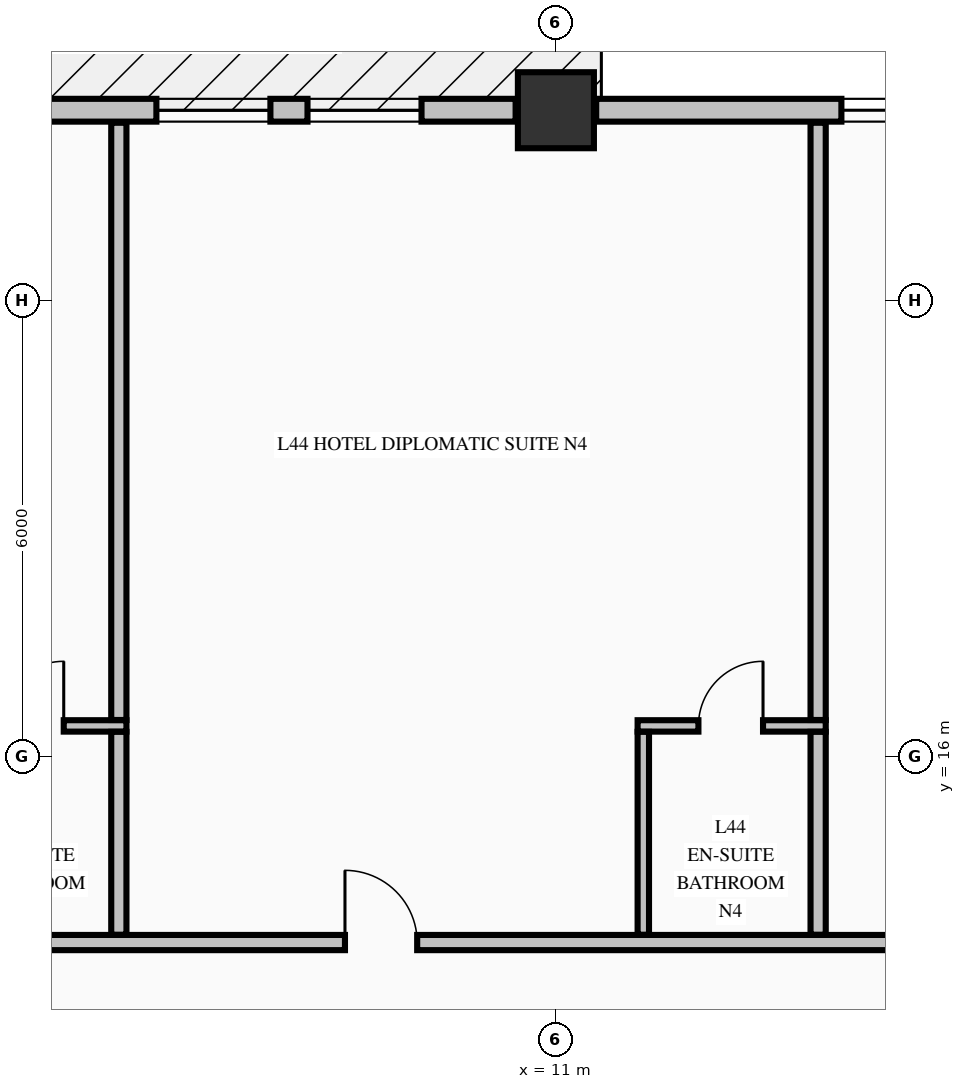
"""IFC4 building model, lengths in metres.
Left out: names, types, materials, properties, quantities, classifications, styles, units other than length and angle.
Written with IfcOpenShell. Run it as: python <this file> out.ifc"""

import sys

from ifc_helpers import new_model, si_unit, direction, frame, frame_2d, origin, origin_2d, place, context, subcontext, project, spatial, rectangle, extrude, element, fill, save


model = new_model("IFC4")
c1 = context("Model", 3, precision=1e-05, world=origin(), true_north=direction((0.0, 1.0)))
c2 = subcontext(c1, "Body", "Model", "MODEL_VIEW")
j1 = project(units=[si_unit("LENGTHUNIT", "METRE"), si_unit("PLANEANGLEUNIT", "RADIAN")], contexts=[c1])
p1 = place(None, origin())
s1 = spatial("IfcSite", under=j1, at=p1, CompositionType="ELEMENT")
p2 = place(p1, origin())
s2 = spatial("IfcBuilding", under=s1, at=p2, CompositionType="ELEMENT")
p3 = place(p2, frame((0.0, 0.0, 172.86)))
s3 = spatial("IfcBuildingStorey", under=s2, at=p3, CompositionType="ELEMENT", Elevation=172.86)
p4 = place(p3, frame((11.0, 24.5, -0.25), z_axis=(0.0, 0.0, 1.0), x_axis=(1.0, 0.0, 0.0)))
e1 = element("IfcColumn", 1, at=p4, inside=s3, PredefinedType="COLUMN", context=c2, shape_type="SweptSolid", body=[
    extrude(rectangle(XDim=1.0, YDim=1.0, at=origin_2d()), origin(), (0.0, 0.0, 1.0), 3.375),
])
p5 = place(p3, frame((10.47, 24.5, 0.0), z_axis=(0.0, 0.0, 1.0), x_axis=(-1.0, 0.0, 0.0)))
e2 = element("IfcWall", 2, at=p5, inside=s3, PredefinedType="STANDARD", context=c2, shape_type="SweptSolid", body=[
    extrude(rectangle(XDim=9.94, YDim=0.3, at=frame_2d((4.97, 0.0))), origin(), (0.0, 0.0, 1.0), 2.517),
])
p6 = place(p5, frame((1.238, 0.0, 0.72)))
e3 = element("IfcOpeningElement", 3, at=p6, cuts=e2, PredefinedType="OPENING", context=c2, shape_type="SweptSolid", body=[
    extrude(rectangle(XDim=1.5, YDim=1.6, at=frame_2d((0.75, 0.8))), frame((0.0, 0.16, 0.0), z_axis=(0.0, -1.0, 0.0), x_axis=(1.0, 0.0, 0.0)), (0.0, 0.0, 1.0), 0.32),
])
p7 = place(p5, frame((3.226, 0.0, 0.72)))
e4 = element("IfcOpeningElement", 4, at=p7, cuts=e2, PredefinedType="OPENING", context=c2, shape_type="SweptSolid", body=[
    extrude(rectangle(XDim=1.5, YDim=1.6, at=frame_2d((0.75, 0.8))), frame((0.0, 0.16, 0.0), z_axis=(0.0, -1.0, 0.0), x_axis=(1.0, 0.0, 0.0)), (0.0, 0.0, 1.0), 0.32),
])
p8 = place(p5, frame((7.202, 0.0, 0.72)))
e5 = element("IfcOpeningElement", 5, at=p8, cuts=e2, PredefinedType="OPENING", context=c2, shape_type="SweptSolid", body=[
    extrude(rectangle(XDim=1.5, YDim=1.6, at=frame_2d((0.75, 0.8))), frame((0.0, 0.16, 0.0), z_axis=(0.0, -1.0, 0.0), x_axis=(1.0, 0.0, 0.0)), (0.0, 0.0, 1.0), 0.32),
])
p9 = place(p3, frame((21.47, 24.5, 0.0), z_axis=(0.0, 0.0, 1.0), x_axis=(-1.0, 0.0, 0.0)))
e6 = element("IfcWall", 6, at=p9, inside=s3, PredefinedType="STANDARD", context=c2, shape_type="SweptSolid", body=[
    extrude(rectangle(XDim=9.94, YDim=0.3, at=frame_2d((4.97, 0.0))), origin(), (0.0, 0.0, 1.0), 2.517),
])
p10 = place(p9, frame((3.226, 0.0, 0.72)))
e7 = element("IfcOpeningElement", 7, at=p10, cuts=e6, PredefinedType="OPENING", context=c2, shape_type="SweptSolid", body=[
    extrude(rectangle(XDim=1.5, YDim=1.6, at=frame_2d((0.75, 0.8))), frame((0.0, 0.16, 0.0), z_axis=(0.0, -1.0, 0.0), x_axis=(1.0, 0.0, 0.0)), (0.0, 0.0, 1.0), 0.32),
])
p11 = place(p9, frame((5.214, 0.0, 0.72)))
e8 = element("IfcOpeningElement", 8, at=p11, cuts=e6, PredefinedType="OPENING", context=c2, shape_type="SweptSolid", body=[
    extrude(rectangle(XDim=1.5, YDim=1.6, at=frame_2d((0.75, 0.8))), frame((0.0, 0.16, 0.0), z_axis=(0.0, -1.0, 0.0), x_axis=(1.0, 0.0, 0.0)), (0.0, 0.0, 1.0), 0.32),
])
p12 = place(p3, frame((-17.1, 13.55, 0.0), z_axis=(0.0, 0.0, 1.0), x_axis=(1.0, 0.0, 0.0)))
e9 = element("IfcWall", 9, at=p12, inside=s3, PredefinedType="PARTITIONING", context=c2, shape_type="SweptSolid", body=[
    extrude(rectangle(XDim=39.2, YDim=0.2, at=frame_2d((19.6, 0.0))), origin(), (0.0, 0.0, 1.0), 3.125),
])
p13 = place(p12, frame((3.695, 0.0, 0.0)))
e10 = element("IfcOpeningElement", 10, at=p13, cuts=e9, PredefinedType="OPENING", context=c2, shape_type="SweptSolid", body=[
    extrude(rectangle(XDim=0.95, YDim=2.15, at=frame_2d((0.475, 1.075))), frame((0.0, 0.11, 0.0), z_axis=(0.0, -1.0, 0.0), x_axis=(1.0, 0.0, 0.0)), (0.0, 0.0, 1.0), 0.22),
])
p14 = place(p12, frame((11.695, 0.0, 0.0)))
e11 = element("IfcOpeningElement", 11, at=p14, cuts=e9, PredefinedType="OPENING", context=c2, shape_type="SweptSolid", body=[
    extrude(rectangle(XDim=0.95, YDim=2.15, at=frame_2d((0.475, 1.075))), frame((0.0, 0.11, 0.0), z_axis=(0.0, -1.0, 0.0), x_axis=(1.0, 0.0, 0.0)), (0.0, 0.0, 1.0), 0.22),
])
p15 = place(p12, frame((17.125, 0.0, 0.0)))
e12 = element("IfcOpeningElement", 12, at=p15, cuts=e9, PredefinedType="OPENING", context=c2, shape_type="SweptSolid", body=[
    extrude(rectangle(XDim=0.95, YDim=2.15, at=frame_2d((0.475, 1.075))), frame((0.0, 0.11, 0.0), z_axis=(0.0, -1.0, 0.0), x_axis=(1.0, 0.0, 0.0)), (0.0, 0.0, 1.0), 0.22),
])
p16 = place(p12, frame((25.325, 0.0, 0.0)))
e13 = element("IfcOpeningElement", 13, at=p16, cuts=e9, PredefinedType="OPENING", context=c2, shape_type="SweptSolid", body=[
    extrude(rectangle(XDim=0.95, YDim=2.15, at=frame_2d((0.475, 1.075))), frame((0.0, 0.11, 0.0), z_axis=(0.0, -1.0, 0.0), x_axis=(1.0, 0.0, 0.0)), (0.0, 0.0, 1.0), 0.22),
])
p17 = place(p12, frame((33.695, 0.0, 0.0)))
e14 = element("IfcOpeningElement", 14, at=p17, cuts=e9, PredefinedType="OPENING", context=c2, shape_type="SweptSolid", body=[
    extrude(rectangle(XDim=0.95, YDim=2.15, at=frame_2d((0.475, 1.075))), frame((0.0, 0.11, 0.0), z_axis=(0.0, -1.0, 0.0), x_axis=(1.0, 0.0, 0.0)), (0.0, 0.0, 1.0), 0.22),
])
p18 = place(p3, frame((2.875, 16.4, 0.0), z_axis=(0.0, 0.0, 1.0), x_axis=(1.0, 0.0, 0.0)))
e15 = element("IfcWall", 15, at=p18, inside=s3, PredefinedType="PARTITIONING", context=c2, shape_type="SweptSolid", body=[
    extrude(rectangle(XDim=2.475, YDim=0.15, at=frame_2d((1.238, 0.0))), origin(), (0.0, 0.0, 1.0), 3.125),
])
p19 = place(p18, frame((0.8, 0.0, 0.0)))
e16 = element("IfcOpeningElement", 16, at=p19, cuts=e15, PredefinedType="OPENING", context=c2, shape_type="SweptSolid", body=[
    extrude(rectangle(XDim=0.85, YDim=2.1, at=frame_2d((0.425, 1.05))), frame((0.0, 0.085, 0.0), z_axis=(0.0, -1.0, 0.0), x_axis=(1.0, 0.0, 0.0)), (0.0, 0.0, 1.0), 0.17),
])
p20 = place(p3, frame((12.075, 16.4, 0.0), z_axis=(0.0, 0.0, 1.0), x_axis=(1.0, 0.0, 0.0)))
e17 = element("IfcWall", 17, at=p20, inside=s3, PredefinedType="PARTITIONING", context=c2, shape_type="SweptSolid", body=[
    extrude(rectangle(XDim=2.475, YDim=0.15, at=frame_2d((1.238, 0.0))), origin(), (0.0, 0.0, 1.0), 3.125),
])
p21 = place(p20, frame((0.8, 0.0, 0.0)))
e18 = element("IfcOpeningElement", 18, at=p21, cuts=e17, PredefinedType="OPENING", context=c2, shape_type="SweptSolid", body=[
    extrude(rectangle(XDim=0.85, YDim=2.1, at=frame_2d((0.425, 1.05))), frame((0.0, 0.085, 0.0), z_axis=(0.0, -1.0, 0.0), x_axis=(1.0, 0.0, 0.0)), (0.0, 0.0, 1.0), 0.17),
])
p22 = place(p3, frame((5.25, 13.653, 0.0), z_axis=(0.0, 0.0, 1.0), x_axis=(0.0, 1.0, 0.0)))
e19 = element("IfcWall", 19, at=p22, inside=s3, PredefinedType="PARTITIONING", context=c2, shape_type="SweptSolid", body=[
    extrude(rectangle(XDim=2.669, YDim=0.2, at=frame_2d((1.334, 0.0))), origin(), (0.0, 0.0, 1.0), 3.125),
])
p23 = place(p3, frame((5.25, 16.478, 0.0), z_axis=(0.0, 0.0, 1.0), x_axis=(0.0, 1.0, 0.0)))
e20 = element("IfcWall", 20, at=p23, inside=s3, PredefinedType="PARTITIONING", context=c2, shape_type="SweptSolid", body=[
    extrude(rectangle(XDim=7.857, YDim=0.2, at=frame_2d((3.928, 0.0))), origin(), (0.0, 0.0, 1.0), 3.125),
])
p24 = place(p3, frame((12.15, 13.653, 0.0), z_axis=(0.0, 0.0, 1.0), x_axis=(0.0, 1.0, 0.0)))
e21 = element("IfcWall", 21, at=p24, inside=s3, PredefinedType="PARTITIONING", context=c2, shape_type="SweptSolid", body=[
    extrude(rectangle(XDim=2.669, YDim=0.15, at=frame_2d((1.334, 0.0))), origin(), (0.0, 0.0, 1.0), 3.125),
])
p25 = place(p3, frame((14.45, 13.653, 0.0), z_axis=(0.0, 0.0, 1.0), x_axis=(0.0, 1.0, 0.0)))
e22 = element("IfcWall", 22, at=p25, inside=s3, PredefinedType="PARTITIONING", context=c2, shape_type="SweptSolid", body=[
    extrude(rectangle(XDim=2.669, YDim=0.2, at=frame_2d((1.334, 0.0))), origin(), (0.0, 0.0, 1.0), 3.125),
])
p26 = place(p3, frame((14.45, 16.478, 0.0), z_axis=(0.0, 0.0, 1.0), x_axis=(0.0, 1.0, 0.0)))
e23 = element("IfcWall", 23, at=p26, inside=s3, PredefinedType="PARTITIONING", context=c2, shape_type="SweptSolid", body=[
    extrude(rectangle(XDim=7.857, YDim=0.2, at=frame_2d((3.928, 0.0))), origin(), (0.0, 0.0, 1.0), 3.125),
])
p27 = place(p6, origin())
e24 = element("IfcWindow", 24, at=p27, inside=s3, PartitioningType="SINGLE_PANEL", PredefinedType="WINDOW", context=c2, shape_type="SweptSolid", body=[
    extrude(rectangle(XDim=1.5, YDim=1.6, at=frame_2d((0.75, 0.8))), frame((0.0, 0.03, 0.0), z_axis=(0.0, -1.0, 0.0), x_axis=(1.0, 0.0, 0.0)), (0.0, 0.0, 1.0), 0.06),
])
fill(e3, e24)
p28 = place(p7, origin())
e25 = element("IfcWindow", 25, at=p28, inside=s3, PartitioningType="SINGLE_PANEL", PredefinedType="WINDOW", context=c2, shape_type="SweptSolid", body=[
    extrude(rectangle(XDim=1.5, YDim=1.6, at=frame_2d((0.75, 0.8))), frame((0.0, 0.03, 0.0), z_axis=(0.0, -1.0, 0.0), x_axis=(1.0, 0.0, 0.0)), (0.0, 0.0, 1.0), 0.06),
])
fill(e4, e25)
p29 = place(p11, origin())
e26 = element("IfcWindow", 26, at=p29, inside=s3, PartitioningType="SINGLE_PANEL", PredefinedType="WINDOW", context=c2, shape_type="SweptSolid", body=[
    extrude(rectangle(XDim=1.5, YDim=1.6, at=frame_2d((0.75, 0.8))), frame((0.0, 0.03, 0.0), z_axis=(0.0, -1.0, 0.0), x_axis=(1.0, 0.0, 0.0)), (0.0, 0.0, 1.0), 0.06),
])
fill(e8, e26)
p30 = place(p19, origin())
e27 = element("IfcDoor", 27, at=p30, inside=s3, OperationType="SINGLE_SWING_RIGHT", PredefinedType="DOOR", context=c2, shape_type="SweptSolid", body=[
    extrude(rectangle(XDim=0.85, YDim=2.1, at=frame_2d((0.425, 1.05))), frame((0.0, 0.025, 0.0), z_axis=(0.0, -1.0, 0.0), x_axis=(1.0, 0.0, 0.0)), (0.0, 0.0, 1.0), 0.05),
])
fill(e16, e27)
p31 = place(p16, origin())
e28 = element("IfcDoor", 28, at=p31, inside=s3, OperationType="SINGLE_SWING_LEFT", PredefinedType="DOOR", context=c2, shape_type="SweptSolid", body=[
    extrude(rectangle(XDim=0.95, YDim=2.15, at=frame_2d((0.475, 1.075))), frame((0.0, 0.025, 0.0), z_axis=(0.0, -1.0, 0.0), x_axis=(1.0, 0.0, 0.0)), (0.0, 0.0, 1.0), 0.05),
])
fill(e13, e28)
p32 = place(p21, origin())
e29 = element("IfcDoor", 29, at=p32, inside=s3, OperationType="SINGLE_SWING_RIGHT", PredefinedType="DOOR", context=c2, shape_type="SweptSolid", body=[
    extrude(rectangle(XDim=0.85, YDim=2.1, at=frame_2d((0.425, 1.05))), frame((0.0, 0.025, 0.0), z_axis=(0.0, -1.0, 0.0), x_axis=(1.0, 0.0, 0.0)), (0.0, 0.0, 1.0), 0.05),
])
fill(e18, e29)
save(model, sys.argv[1])
